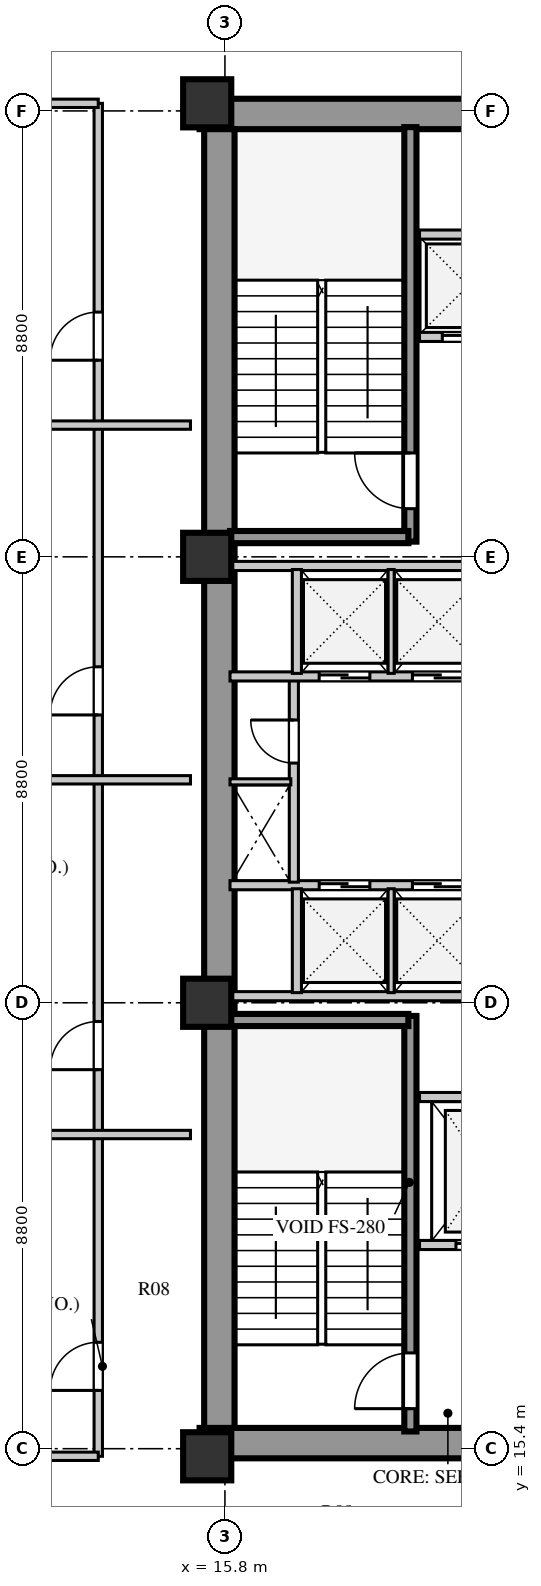
"""IFC4 building model, lengths in metres.
Left out: names, types, materials, properties, quantities, classifications, styles, units other than length and angle.
Written with IfcOpenShell. Run it as: python <this file> out.ifc"""

import sys

from ifc_helpers import new_model, si_unit, direction, frame, frame_2d, origin, origin_2d, place, context, subcontext, project, spatial, rectangle, extrude, element, fill, save


model = new_model("IFC4")
c1 = context("Model", 3, precision=1e-05, world=origin(), true_north=direction((0.0, 1.0)))
c2 = subcontext(c1, "Body", "Model", "MODEL_VIEW")
j1 = project(units=[si_unit("LENGTHUNIT", "METRE"), si_unit("PLANEANGLEUNIT", "RADIAN")], contexts=[c1])
p1 = place(None, origin())
s1 = spatial("IfcSite", under=j1, at=p1, CompositionType="ELEMENT")
p2 = place(p1, origin())
s2 = spatial("IfcBuilding", under=s1, at=p2, CompositionType="ELEMENT")
p3 = place(p2, frame((0.0, 0.0, 17.0)))
s3 = spatial("IfcBuildingStorey", under=s2, at=p3, CompositionType="ELEMENT", Elevation=17.0)
for number, where, z_axis, x_axis in (
    (1, (15.3, 15.51, 0.0), (0.0, 0.0, 1.0), (1.0, 0.0, 0.0)),
    (2, (15.3, 41.74, 0.0), (0.0, 0.0, 1.0), (1.0, 0.0, 0.0)),
):
    element("IfcWall", number, at=place(p3, frame(where, z_axis=z_axis, x_axis=x_axis)), inside=s3, PredefinedType="SHEAR", context=c2, shape_type="SweptSolid", body=[
        extrude(rectangle(XDim=9.88, YDim=0.6, at=frame_2d((4.94, 0.0))), origin(), (0.0, 0.0, 1.0), 4.22),
    ])
p4 = place(p3, frame((15.69, 15.81, 0.0), z_axis=(0.0, 0.0, 1.0), x_axis=(0.0, 1.0, 0.0)))
e3 = element("IfcWall", 3, at=p4, inside=s3, PredefinedType="SHEAR", context=c2, shape_type="SweptSolid", body=[
    extrude(rectangle(XDim=25.63, YDim=0.6, at=frame_2d((12.815, 0.0))), origin(), (0.0, 0.0, 1.0), 4.22),
])
for number, where, z_axis, x_axis in (
    (4, (15.45, 15.25, 0.0), (0.0, 0.0, 1.0), (1.0, 0.0, 0.0)),
    (5, (15.45, 24.2, 0.0), (0.0, 0.0, 1.0), (1.0, 0.0, 0.0)),
    (6, (15.45, 33.0, 0.0), (0.0, 0.0, 1.0), (1.0, 0.0, 0.0)),
    (7, (15.45, 41.95, 0.0), (0.0, 0.0, 1.0), (1.0, 0.0, 0.0)),
):
    element("IfcColumn", number, at=place(p3, frame(where, z_axis=z_axis, x_axis=x_axis)), inside=s3, PredefinedType="COLUMN", context=c2, shape_type="SweptSolid", body=[
        extrude(rectangle(XDim=0.95, YDim=0.95, at=origin_2d()), origin(), (0.0, 0.0, 1.0), 4.22),
    ])
p5 = place(p3, frame((19.46, 15.74, 0.0), z_axis=(0.0, 0.0, 1.0), x_axis=(0.0, 1.0, 0.0)))
e8 = element("IfcWall", 8, at=p5, inside=s3, PredefinedType="SHEAR", context=c2, shape_type="SweptSolid", body=[
    extrude(rectangle(XDim=8.2, YDim=0.24, at=frame_2d((4.1, 0.0))), origin(), (0.0, 0.0, 1.0), 4.5),
])
p6 = place(p5, frame((0.45, 0.0, 0.0)))
e9 = element("IfcOpeningElement", 9, at=p6, cuts=e8, PredefinedType="OPENING", context=c2, shape_type="SweptSolid", body=[
    extrude(rectangle(XDim=1.1, YDim=2.1, at=frame_2d((0.55, 1.05))), frame((0.0, 0.13, 0.0), z_axis=(0.0, -1.0, 0.0), x_axis=(1.0, 0.0, 0.0)), (0.0, 0.0, 1.0), 0.26),
])
p7 = place(p3, frame((15.9, 23.86, 0.0), z_axis=(0.0, 0.0, 1.0), x_axis=(1.0, 0.0, 0.0)))
e10 = element("IfcWall", 10, at=p7, inside=s3, PredefinedType="SHEAR", context=c2, shape_type="SweptSolid", body=[
    extrude(rectangle(XDim=3.52, YDim=0.24, at=frame_2d((1.76, 0.0))), origin(), (0.0, 0.0, 1.0), 4.5),
])
p8 = place(p3, frame((19.64, 19.42, 0.0), z_axis=(0.0, 0.0, 1.0), x_axis=(1.0, 0.0, 0.0)))
e11 = element("IfcWall", 11, at=p8, inside=s3, PredefinedType="SOLIDWALL", context=c2, shape_type="SweptSolid", body=[
    extrude(rectangle(XDim=4.94, YDim=0.18, at=frame_2d((2.47, 0.0))), origin(), (0.0, 0.0, 1.0), 4.22),
])
p9 = place(p8, frame((0.72, 0.0, 0.0)))
e12 = element("IfcOpeningElement", 12, at=p9, cuts=e11, PredefinedType="OPENING", context=c2, shape_type="SweptSolid", body=[
    extrude(rectangle(XDim=1.1, YDim=2.1, at=frame_2d((0.55, 1.05))), frame((0.0, 0.1, 0.0), z_axis=(0.0, -1.0, 0.0), x_axis=(1.0, 0.0, 0.0)), (0.0, 0.0, 1.0), 0.2),
])
p10 = place(p8, frame((3.02, 0.0, 0.0)))
e13 = element("IfcOpeningElement", 13, at=p10, cuts=e11, PredefinedType="OPENING", context=c2, shape_type="SweptSolid", body=[
    extrude(rectangle(XDim=1.1, YDim=2.1, at=frame_2d((0.55, 1.05))), frame((0.0, 0.1, 0.0), z_axis=(0.0, -1.0, 0.0), x_axis=(1.0, 0.0, 0.0)), (0.0, 0.0, 1.0), 0.2),
])
p11 = place(p3, frame((19.64, 22.34, 0.0), z_axis=(0.0, 0.0, 1.0), x_axis=(1.0, 0.0, 0.0)))
e14 = element("IfcWall", 14, at=p11, inside=s3, PredefinedType="SOLIDWALL", context=c2, shape_type="SweptSolid", body=[
    extrude(rectangle(XDim=4.94, YDim=0.18, at=frame_2d((2.47, 0.0))), origin(), (0.0, 0.0, 1.0), 4.22),
])
p12 = place(p3, frame((15.9, 26.52, 0.0), z_axis=(0.0, 0.0, 1.0), x_axis=(1.0, 0.0, 0.0)))
e15 = element("IfcWall", 15, at=p12, inside=s3, PredefinedType="SOLIDWALL", context=c2, shape_type="SweptSolid", body=[
    extrude(rectangle(XDim=8.68, YDim=0.18, at=frame_2d((4.34, 0.0))), origin(), (0.0, 0.0, 1.0), 4.22),
])
p13 = place(p12, frame((1.76, 0.0, 0.0)))
e16 = element("IfcOpeningElement", 16, at=p13, cuts=e15, PredefinedType="OPENING", context=c2, shape_type="SweptSolid", body=[
    extrude(rectangle(XDim=1.0, YDim=2.1, at=frame_2d((0.5, 1.05))), frame((0.0, 0.1, 0.0), z_axis=(0.0, -1.0, 0.0), x_axis=(1.0, 0.0, 0.0)), (0.0, 0.0, 1.0), 0.2),
])
p14 = place(p12, frame((3.6, 0.0, 0.0)))
e17 = element("IfcOpeningElement", 17, at=p14, cuts=e15, PredefinedType="OPENING", context=c2, shape_type="SweptSolid", body=[
    extrude(rectangle(XDim=1.0, YDim=2.1, at=frame_2d((0.5, 1.05))), frame((0.0, 0.1, 0.0), z_axis=(0.0, -1.0, 0.0), x_axis=(1.0, 0.0, 0.0)), (0.0, 0.0, 1.0), 0.2),
])
p15 = place(p12, frame((5.44, 0.0, 0.0)))
e18 = element("IfcOpeningElement", 18, at=p15, cuts=e15, PredefinedType="OPENING", context=c2, shape_type="SweptSolid", body=[
    extrude(rectangle(XDim=1.0, YDim=2.1, at=frame_2d((0.5, 1.05))), frame((0.0, 0.1, 0.0), z_axis=(0.0, -1.0, 0.0), x_axis=(1.0, 0.0, 0.0)), (0.0, 0.0, 1.0), 0.2),
])
p16 = place(p12, frame((7.28, 0.0, 0.0)))
e19 = element("IfcOpeningElement", 19, at=p16, cuts=e15, PredefinedType="OPENING", context=c2, shape_type="SweptSolid", body=[
    extrude(rectangle(XDim=1.0, YDim=2.1, at=frame_2d((0.5, 1.05))), frame((0.0, 0.1, 0.0), z_axis=(0.0, -1.0, 0.0), x_axis=(1.0, 0.0, 0.0)), (0.0, 0.0, 1.0), 0.2),
])
p17 = place(p3, frame((15.9, 24.33, 0.0), z_axis=(0.0, 0.0, 1.0), x_axis=(1.0, 0.0, 0.0)))
e20 = element("IfcWall", 20, at=p17, inside=s3, PredefinedType="SOLIDWALL", context=c2, shape_type="SweptSolid", body=[
    extrude(rectangle(XDim=8.68, YDim=0.18, at=frame_2d((4.34, 0.0))), origin(), (0.0, 0.0, 1.0), 3.42),
])
p18 = place(p3, frame((17.22, 24.4, 0.0), z_axis=(0.0, 0.0, 1.0), x_axis=(0.0, 1.0, 0.0)))
e21 = element("IfcWall", 21, at=p18, inside=s3, PredefinedType="SOLIDWALL", context=c2, shape_type="SweptSolid", body=[
    extrude(rectangle(XDim=2.05, YDim=0.18, at=frame_2d((1.025, 0.0))), origin(), (0.0, 0.0, 1.0), 4.22),
])
p19 = place(p3, frame((19.08, 24.4, 0.0), z_axis=(0.0, 0.0, 1.0), x_axis=(0.0, 1.0, 0.0)))
e22 = element("IfcWall", 22, at=p19, inside=s3, PredefinedType="PARTITIONING", context=c2, shape_type="SweptSolid", body=[
    extrude(rectangle(XDim=2.05, YDim=0.12, at=frame_2d((1.025, 0.0))), origin(), (0.0, 0.0, 1.0), 4.22),
])
p20 = place(p3, frame((17.16, 26.58, 0.0), z_axis=(0.0, 0.0, 1.0), x_axis=(0.0, 1.0, 0.0)))
e23 = element("IfcWall", 23, at=p20, inside=s3, PredefinedType="SOLIDWALL", context=c2, shape_type="SweptSolid", body=[
    extrude(rectangle(XDim=4.02, YDim=0.18, at=frame_2d((2.01, 0.0))), origin(), (0.0, 0.0, 1.0), 4.22),
])
p21 = place(p20, frame((2.35, 0.0, 0.0)))
e24 = element("IfcOpeningElement", 24, at=p21, cuts=e23, PredefinedType="OPENING", context=c2, shape_type="SweptSolid", body=[
    extrude(rectangle(XDim=0.85, YDim=2.06, at=frame_2d((0.425, 1.03))), frame((0.0, 0.1, 0.0), z_axis=(0.0, -1.0, 0.0), x_axis=(1.0, 0.0, 0.0)), (0.0, 0.0, 1.0), 0.2),
])
p22 = place(p3, frame((15.9, 28.56, 0.0), z_axis=(0.0, 0.0, 1.0), x_axis=(1.0, 0.0, 0.0)))
e25 = element("IfcWall", 25, at=p22, inside=s3, PredefinedType="PARTITIONING", context=c2, shape_type="SweptSolid", body=[
    extrude(rectangle(XDim=1.2, YDim=0.12, at=frame_2d((0.6, 0.0))), origin(), (0.0, 0.0, 1.0), 4.22),
])
p23 = place(p3, frame((15.9, 30.64, 0.0), z_axis=(0.0, 0.0, 1.0), x_axis=(1.0, 0.0, 0.0)))
e26 = element("IfcWall", 26, at=p23, inside=s3, PredefinedType="SOLIDWALL", context=c2, shape_type="SweptSolid", body=[
    extrude(rectangle(XDim=8.68, YDim=0.18, at=frame_2d((4.34, 0.0))), origin(), (0.0, 0.0, 1.0), 4.22),
])
p24 = place(p23, frame((1.76, 0.0, 0.0)))
e27 = element("IfcOpeningElement", 27, at=p24, cuts=e26, PredefinedType="OPENING", context=c2, shape_type="SweptSolid", body=[
    extrude(rectangle(XDim=1.0, YDim=2.1, at=frame_2d((0.5, 1.05))), frame((0.0, 0.1, 0.0), z_axis=(0.0, -1.0, 0.0), x_axis=(1.0, 0.0, 0.0)), (0.0, 0.0, 1.0), 0.2),
])
p25 = place(p23, frame((3.6, 0.0, 0.0)))
e28 = element("IfcOpeningElement", 28, at=p25, cuts=e26, PredefinedType="OPENING", context=c2, shape_type="SweptSolid", body=[
    extrude(rectangle(XDim=1.0, YDim=2.1, at=frame_2d((0.5, 1.05))), frame((0.0, 0.1, 0.0), z_axis=(0.0, -1.0, 0.0), x_axis=(1.0, 0.0, 0.0)), (0.0, 0.0, 1.0), 0.2),
])
p26 = place(p23, frame((5.44, 0.0, 0.0)))
e29 = element("IfcOpeningElement", 29, at=p26, cuts=e26, PredefinedType="OPENING", context=c2, shape_type="SweptSolid", body=[
    extrude(rectangle(XDim=1.0, YDim=2.1, at=frame_2d((0.5, 1.05))), frame((0.0, 0.1, 0.0), z_axis=(0.0, -1.0, 0.0), x_axis=(1.0, 0.0, 0.0)), (0.0, 0.0, 1.0), 0.2),
])
p27 = place(p23, frame((7.28, 0.0, 0.0)))
e30 = element("IfcOpeningElement", 30, at=p27, cuts=e26, PredefinedType="OPENING", context=c2, shape_type="SweptSolid", body=[
    extrude(rectangle(XDim=1.0, YDim=2.1, at=frame_2d((0.5, 1.05))), frame((0.0, 0.1, 0.0), z_axis=(0.0, -1.0, 0.0), x_axis=(1.0, 0.0, 0.0)), (0.0, 0.0, 1.0), 0.2),
])
p28 = place(p3, frame((15.9, 32.82, 0.0), z_axis=(0.0, 0.0, 1.0), x_axis=(1.0, 0.0, 0.0)))
e31 = element("IfcWall", 31, at=p28, inside=s3, PredefinedType="SOLIDWALL", context=c2, shape_type="SweptSolid", body=[
    extrude(rectangle(XDim=8.68, YDim=0.18, at=frame_2d((4.34, 0.0))), origin(), (0.0, 0.0, 1.0), 3.42),
])
p29 = place(p3, frame((17.22, 30.7, 0.0), z_axis=(0.0, 0.0, 1.0), x_axis=(0.0, 1.0, 0.0)))
e32 = element("IfcWall", 32, at=p29, inside=s3, PredefinedType="SOLIDWALL", context=c2, shape_type="SweptSolid", body=[
    extrude(rectangle(XDim=2.05, YDim=0.18, at=frame_2d((1.025, 0.0))), origin(), (0.0, 0.0, 1.0), 4.22),
])
p30 = place(p3, frame((19.08, 30.7, 0.0), z_axis=(0.0, 0.0, 1.0), x_axis=(0.0, 1.0, 0.0)))
e33 = element("IfcWall", 33, at=p30, inside=s3, PredefinedType="PARTITIONING", context=c2, shape_type="SweptSolid", body=[
    extrude(rectangle(XDim=2.05, YDim=0.12, at=frame_2d((1.025, 0.0))), origin(), (0.0, 0.0, 1.0), 4.22),
])
p31 = place(p3, frame((19.46, 33.3, 0.0), z_axis=(0.0, 0.0, 1.0), x_axis=(0.0, 1.0, 0.0)))
e34 = element("IfcWall", 34, at=p31, inside=s3, PredefinedType="SHEAR", context=c2, shape_type="SweptSolid", body=[
    extrude(rectangle(XDim=8.18, YDim=0.24, at=frame_2d((4.09, 0.0))), origin(), (0.0, 0.0, 1.0), 4.5),
])
p32 = place(p31, frame((0.65, 0.0, 0.0)))
e35 = element("IfcOpeningElement", 35, at=p32, cuts=e34, PredefinedType="OPENING", context=c2, shape_type="SweptSolid", body=[
    extrude(rectangle(XDim=1.1, YDim=2.1, at=frame_2d((0.55, 1.05))), frame((0.0, 0.13, 0.0), z_axis=(0.0, -1.0, 0.0), x_axis=(1.0, 0.0, 0.0)), (0.0, 0.0, 1.0), 0.26),
])
p33 = place(p3, frame((15.9, 33.39, 0.0), z_axis=(0.0, 0.0, 1.0), x_axis=(1.0, 0.0, 0.0)))
e36 = element("IfcWall", 36, at=p33, inside=s3, PredefinedType="SHEAR", context=c2, shape_type="SweptSolid", body=[
    extrude(rectangle(XDim=3.52, YDim=0.24, at=frame_2d((1.76, 0.0))), origin(), (0.0, 0.0, 1.0), 4.5),
])
p34 = place(p3, frame((19.64, 37.34, 0.0), z_axis=(0.0, 0.0, 1.0), x_axis=(1.0, 0.0, 0.0)))
e37 = element("IfcWall", 37, at=p34, inside=s3, PredefinedType="SOLIDWALL", context=c2, shape_type="SweptSolid", body=[
    extrude(rectangle(XDim=4.94, YDim=0.18, at=frame_2d((2.47, 0.0))), origin(), (0.0, 0.0, 1.0), 4.22),
])
p35 = place(p34, frame((0.45, 0.0, 0.0)))
e38 = element("IfcOpeningElement", 38, at=p35, cuts=e37, PredefinedType="OPENING", context=c2, shape_type="SweptSolid", body=[
    extrude(rectangle(XDim=1.0, YDim=2.1, at=frame_2d((0.5, 1.05))), frame((0.0, 0.1, 0.0), z_axis=(0.0, -1.0, 0.0), x_axis=(1.0, 0.0, 0.0)), (0.0, 0.0, 1.0), 0.2),
])
p36 = place(p34, frame((2.5, 0.0, 0.0)))
e39 = element("IfcOpeningElement", 39, at=p36, cuts=e37, PredefinedType="OPENING", context=c2, shape_type="SweptSolid", body=[
    extrude(rectangle(XDim=1.0, YDim=2.1, at=frame_2d((0.5, 1.05))), frame((0.0, 0.1, 0.0), z_axis=(0.0, -1.0, 0.0), x_axis=(1.0, 0.0, 0.0)), (0.0, 0.0, 1.0), 0.2),
])
p37 = place(p3, frame((19.64, 39.36, 0.0), z_axis=(0.0, 0.0, 1.0), x_axis=(1.0, 0.0, 0.0)))
e40 = element("IfcWall", 40, at=p37, inside=s3, PredefinedType="SOLIDWALL", context=c2, shape_type="SweptSolid", body=[
    extrude(rectangle(XDim=4.94, YDim=0.18, at=frame_2d((2.47, 0.0))), origin(), (0.0, 0.0, 1.0), 4.22),
])
p38 = place(p3, frame((13.3, 15.25, 0.0), z_axis=(0.0, 0.0, 1.0), x_axis=(0.0, 1.0, 0.0)))
e41 = element("IfcWall", 41, at=p38, inside=s3, PredefinedType="PARTITIONING", context=c2, shape_type="SweptSolid", body=[
    extrude(rectangle(XDim=26.7, YDim=0.165, at=frame_2d((13.35, 0.0))), origin(), (0.0, 0.0, 1.0), 4.22),
])
p39 = place(p38, frame((1.3, 0.0, 0.0)))
e42 = element("IfcOpeningElement", 42, at=p39, cuts=e41, PredefinedType="OPENING", context=c2, shape_type="SweptSolid", body=[
    extrude(rectangle(XDim=0.95, YDim=2.08, at=frame_2d((0.475, 1.04))), frame((0.0, 0.093, 0.0), z_axis=(0.0, -1.0, 0.0), x_axis=(1.0, 0.0, 0.0)), (0.0, 0.0, 1.0), 0.185),
])
p40 = place(p38, frame((7.63, 0.0, 0.0)))
e43 = element("IfcOpeningElement", 43, at=p40, cuts=e41, PredefinedType="OPENING", context=c2, shape_type="SweptSolid", body=[
    extrude(rectangle(XDim=0.95, YDim=2.08, at=frame_2d((0.475, 1.04))), frame((0.0, 0.093, 0.0), z_axis=(0.0, -1.0, 0.0), x_axis=(1.0, 0.0, 0.0)), (0.0, 0.0, 1.0), 0.185),
])
p41 = place(p38, frame((14.63, 0.0, 0.0)))
e44 = element("IfcOpeningElement", 44, at=p41, cuts=e41, PredefinedType="OPENING", context=c2, shape_type="SweptSolid", body=[
    extrude(rectangle(XDim=0.95, YDim=2.08, at=frame_2d((0.475, 1.04))), frame((0.0, 0.093, 0.0), z_axis=(0.0, -1.0, 0.0), x_axis=(1.0, 0.0, 0.0)), (0.0, 0.0, 1.0), 0.185),
])
p42 = place(p38, frame((21.63, 0.0, 0.0)))
e45 = element("IfcOpeningElement", 45, at=p42, cuts=e41, PredefinedType="OPENING", context=c2, shape_type="SweptSolid", body=[
    extrude(rectangle(XDim=0.95, YDim=2.08, at=frame_2d((0.475, 1.04))), frame((0.0, 0.093, 0.0), z_axis=(0.0, -1.0, 0.0), x_axis=(1.0, 0.0, 0.0)), (0.0, 0.0, 1.0), 0.185),
])
for number, where, z_axis, x_axis in (
    (46, (6.88, 15.25, 0.0), (0.0, 0.0, 1.0), (1.0, 0.0, 0.0)),
    (47, (6.88, 41.95, 0.0), (0.0, 0.0, 1.0), (1.0, 0.0, 0.0)),
):
    element("IfcWall", number, at=place(p3, frame(where, z_axis=z_axis, x_axis=x_axis)), inside=s3, PredefinedType="PARTITIONING", context=c2, shape_type="SweptSolid", body=[
        extrude(rectangle(XDim=6.42, YDim=0.165, at=frame_2d((3.21, 0.0))), origin(), (0.0, 0.0, 1.0), 3.72),
    ])
for number, where, z_axis, x_axis in (
    (48, (6.88, 21.6, 0.0), (0.0, 0.0, 1.0), (1.0, 0.0, 0.0)),
    (49, (6.88, 28.6, 0.0), (0.0, 0.0, 1.0), (1.0, 0.0, 0.0)),
    (50, (6.88, 35.6, 0.0), (0.0, 0.0, 1.0), (1.0, 0.0, 0.0)),
):
    element("IfcWall", number, at=place(p3, frame(where, z_axis=z_axis, x_axis=x_axis)), inside=s3, PredefinedType="PARTITIONING", context=c2, shape_type="SweptSolid", body=[
        extrude(rectangle(XDim=8.24, YDim=0.165, at=frame_2d((4.12, 0.0))), origin(), (0.0, 0.0, 1.0), 4.22),
    ])
p43 = place(p6, origin())
e51 = element("IfcDoor", 51, at=p43, inside=s3, OperationType="SINGLE_SWING_LEFT", PredefinedType="DOOR", context=c2, shape_type="SweptSolid", body=[
    extrude(rectangle(XDim=1.1, YDim=2.1, at=frame_2d((0.55, 1.05))), frame((0.0, 0.025, 0.0), z_axis=(0.0, -1.0, 0.0), x_axis=(1.0, 0.0, 0.0)), (0.0, 0.0, 1.0), 0.05),
])
fill(e9, e51)
p44 = place(p9, origin())
e52 = element("IfcDoor", 52, at=p44, inside=s3, OperationType="DOUBLE_DOOR_SLIDING", PredefinedType="DOOR", context=c2, shape_type="SweptSolid", body=[
    extrude(rectangle(XDim=1.1, YDim=2.1, at=frame_2d((0.55, 1.05))), frame((0.0, 0.025, 0.0), z_axis=(0.0, -1.0, 0.0), x_axis=(1.0, 0.0, 0.0)), (0.0, 0.0, 1.0), 0.05),
])
fill(e12, e52)
p45 = place(p13, origin())
e53 = element("IfcDoor", 53, at=p45, inside=s3, OperationType="DOUBLE_DOOR_SLIDING", PredefinedType="DOOR", context=c2, shape_type="SweptSolid", body=[
    extrude(rectangle(XDim=1.0, YDim=2.1, at=frame_2d((0.5, 1.05))), frame((0.0, 0.025, 0.0), z_axis=(0.0, -1.0, 0.0), x_axis=(1.0, 0.0, 0.0)), (0.0, 0.0, 1.0), 0.05),
])
fill(e16, e53)
p46 = place(p14, origin())
e54 = element("IfcDoor", 54, at=p46, inside=s3, OperationType="DOUBLE_DOOR_SLIDING", PredefinedType="DOOR", context=c2, shape_type="SweptSolid", body=[
    extrude(rectangle(XDim=1.0, YDim=2.1, at=frame_2d((0.5, 1.05))), frame((0.0, 0.025, 0.0), z_axis=(0.0, -1.0, 0.0), x_axis=(1.0, 0.0, 0.0)), (0.0, 0.0, 1.0), 0.05),
])
fill(e17, e54)
p47 = place(p21, origin())
e55 = element("IfcDoor", 55, at=p47, inside=s3, OperationType="SINGLE_SWING_RIGHT", PredefinedType="DOOR", context=c2, shape_type="SweptSolid", body=[
    extrude(rectangle(XDim=0.85, YDim=2.06, at=frame_2d((0.425, 1.03))), frame((0.0, 0.025, 0.0), z_axis=(0.0, -1.0, 0.0), x_axis=(1.0, 0.0, 0.0)), (0.0, 0.0, 1.0), 0.05),
])
fill(e24, e55)
p48 = place(p24, frame((1.0, 0.0, 0.0), z_axis=(0.0, 0.0, 1.0), x_axis=(-1.0, 0.0, 0.0)))
e56 = element("IfcDoor", 56, at=p48, inside=s3, OperationType="DOUBLE_DOOR_SLIDING", PredefinedType="DOOR", context=c2, shape_type="SweptSolid", body=[
    extrude(rectangle(XDim=1.0, YDim=2.1, at=frame_2d((0.5, 1.05))), frame((0.0, 0.025, 0.0), z_axis=(0.0, -1.0, 0.0), x_axis=(1.0, 0.0, 0.0)), (0.0, 0.0, 1.0), 0.05),
])
fill(e27, e56)
p49 = place(p25, frame((1.0, 0.0, 0.0), z_axis=(0.0, 0.0, 1.0), x_axis=(-1.0, 0.0, 0.0)))
e57 = element("IfcDoor", 57, at=p49, inside=s3, OperationType="DOUBLE_DOOR_SLIDING", PredefinedType="DOOR", context=c2, shape_type="SweptSolid", body=[
    extrude(rectangle(XDim=1.0, YDim=2.1, at=frame_2d((0.5, 1.05))), frame((0.0, 0.025, 0.0), z_axis=(0.0, -1.0, 0.0), x_axis=(1.0, 0.0, 0.0)), (0.0, 0.0, 1.0), 0.05),
])
fill(e28, e57)
p50 = place(p32, origin())
e58 = element("IfcDoor", 58, at=p50, inside=s3, OperationType="SINGLE_SWING_RIGHT", PredefinedType="DOOR", context=c2, shape_type="SweptSolid", body=[
    extrude(rectangle(XDim=1.1, YDim=2.1, at=frame_2d((0.55, 1.05))), frame((0.0, 0.025, 0.0), z_axis=(0.0, -1.0, 0.0), x_axis=(1.0, 0.0, 0.0)), (0.0, 0.0, 1.0), 0.05),
])
fill(e35, e58)
p51 = place(p35, frame((1.0, 0.0, 0.0), z_axis=(0.0, 0.0, 1.0), x_axis=(-1.0, 0.0, 0.0)))
e59 = element("IfcDoor", 59, at=p51, inside=s3, OperationType="DOUBLE_DOOR_SLIDING", PredefinedType="DOOR", context=c2, shape_type="SweptSolid", body=[
    extrude(rectangle(XDim=1.0, YDim=2.1, at=frame_2d((0.5, 1.05))), frame((0.0, 0.025, 0.0), z_axis=(0.0, -1.0, 0.0), x_axis=(1.0, 0.0, 0.0)), (0.0, 0.0, 1.0), 0.05),
])
fill(e38, e59)
p52 = place(p39, origin())
e60 = element("IfcDoor", 60, at=p52, inside=s3, OperationType="SINGLE_SWING_LEFT", PredefinedType="DOOR", context=c2, shape_type="SweptSolid", body=[
    extrude(rectangle(XDim=0.95, YDim=2.08, at=frame_2d((0.475, 1.04))), frame((0.0, 0.025, 0.0), z_axis=(0.0, -1.0, 0.0), x_axis=(1.0, 0.0, 0.0)), (0.0, 0.0, 1.0), 0.05),
])
fill(e42, e60)
p53 = place(p40, origin())
e61 = element("IfcDoor", 61, at=p53, inside=s3, OperationType="SINGLE_SWING_LEFT", PredefinedType="DOOR", context=c2, shape_type="SweptSolid", body=[
    extrude(rectangle(XDim=0.95, YDim=2.08, at=frame_2d((0.475, 1.04))), frame((0.0, 0.025, 0.0), z_axis=(0.0, -1.0, 0.0), x_axis=(1.0, 0.0, 0.0)), (0.0, 0.0, 1.0), 0.05),
])
fill(e43, e61)
p54 = place(p41, origin())
e62 = element("IfcDoor", 62, at=p54, inside=s3, OperationType="SINGLE_SWING_LEFT", PredefinedType="DOOR", context=c2, shape_type="SweptSolid", body=[
    extrude(rectangle(XDim=0.95, YDim=2.08, at=frame_2d((0.475, 1.04))), frame((0.0, 0.025, 0.0), z_axis=(0.0, -1.0, 0.0), x_axis=(1.0, 0.0, 0.0)), (0.0, 0.0, 1.0), 0.05),
])
fill(e44, e62)
p55 = place(p42, origin())
e63 = element("IfcDoor", 63, at=p55, inside=s3, OperationType="SINGLE_SWING_LEFT", PredefinedType="DOOR", context=c2, shape_type="SweptSolid", body=[
    extrude(rectangle(XDim=0.95, YDim=2.08, at=frame_2d((0.475, 1.04))), frame((0.0, 0.025, 0.0), z_axis=(0.0, -1.0, 0.0), x_axis=(1.0, 0.0, 0.0)), (0.0, 0.0, 1.0), 0.05),
])
fill(e45, e63)
save(model, sys.argv[1])
